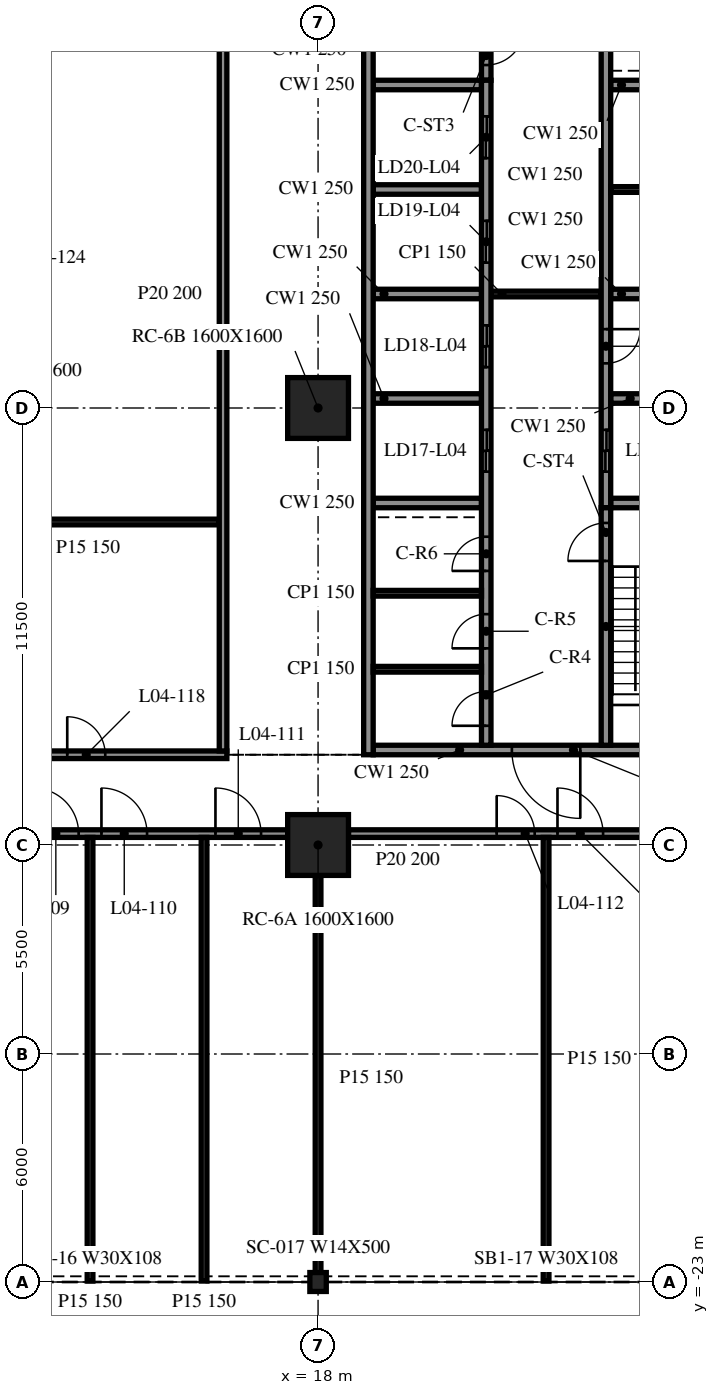
"""IFC4 building model, lengths in metres.
Left out: names, types, materials, properties, quantities, classifications, styles, units other than length and angle.
Written with IfcOpenShell. Run it as: python <this file> out.ifc"""

import sys

from ifc_helpers import new_model, si_unit, direction, frame, frame_2d, origin, origin_2d, place, context, subcontext, project, spatial, rectangle, i_section, extrude, element, fill, save


model = new_model("IFC4")
c1 = context("Model", 3, precision=1e-05, world=origin(), true_north=direction((0.0, 1.0)))
c2 = subcontext(c1, "Body", "Model", "MODEL_VIEW")
j1 = project(units=[si_unit("LENGTHUNIT", "METRE"), si_unit("PLANEANGLEUNIT", "RADIAN")], contexts=[c1])
p1 = place(None, origin())
s1 = spatial("IfcSite", under=j1, at=p1, CompositionType="ELEMENT")
p2 = place(p1, origin())
s2 = spatial("IfcBuilding", under=s1, at=p2, CompositionType="ELEMENT")
p3 = place(p2, frame((0.0, 0.0, 20.1)))
s3 = spatial("IfcBuildingStorey", under=s2, at=p3, CompositionType="ELEMENT", Elevation=20.1)
for number, where, z_axis, x_axis in (
    (1, (18.0, -11.5, -0.34), (0.0, 0.0, 1.0), (1.0, 0.0, 0.0)),
    (2, (18.0, 0.0, -0.34), (0.0, 0.0, 1.0), (1.0, 0.0, 0.0)),
):
    element("IfcColumn", number, at=place(p3, frame(where, z_axis=z_axis, x_axis=x_axis)), inside=s3, PredefinedType="COLUMN", context=c2, shape_type="SweptSolid", body=[
        extrude(rectangle(XDim=1.6, YDim=1.6, at=origin_2d()), origin(), (0.0, 0.0, 1.0), 4.3),
    ])
p4 = place(p3, frame((18.0, -23.0, -0.34), z_axis=(0.0, 0.0, 1.0), x_axis=(1.0, 0.0, 0.0)))
e3 = element("IfcColumn", 3, at=p4, inside=s3, PredefinedType="COLUMN", context=c2, shape_type="SweptSolid", body=[
    extrude(i_section(OverallWidth=0.432, OverallDepth=0.498, WebThickness=0.056, FlangeThickness=0.089, at=origin_2d()), origin(), (0.0, 0.0, 1.0), 4.3),
])
p5 = place(p3, frame((19.325, 15.125, 0.0), z_axis=(0.0, 0.0, 1.0), x_axis=(0.0, -1.0, 0.0)))
e4 = element("IfcWall", 4, at=p5, inside=s3, PredefinedType="SOLIDWALL", context=c2, shape_type="SweptSolid", body=[
    extrude(rectangle(XDim=24.25, YDim=0.25, at=frame_2d((12.125, 0.0))), origin(), (0.0, 0.0, 1.0), 3.96),
])
p6 = place(p3, frame((28.55, -9.0, 0.0), z_axis=(0.0, 0.0, 1.0), x_axis=(-1.0, 0.0, 0.0)))
e5 = element("IfcWall", 5, at=p6, inside=s3, PredefinedType="SOLIDWALL", context=c2, shape_type="SweptSolid", body=[
    extrude(rectangle(XDim=9.1, YDim=0.25, at=frame_2d((4.55, 0.0))), origin(), (0.0, 0.0, 1.0), 3.96),
])
p7 = place(p6, frame((3.65, 0.0, 0.0)))
e6 = element("IfcOpeningElement", 6, at=p7, cuts=e5, PredefinedType="OPENING", context=c2, shape_type="SweptSolid", body=[
    extrude(rectangle(XDim=1.8, YDim=2.1, at=frame_2d((0.9, 1.05))), frame((0.0, 0.135, 0.0), z_axis=(0.0, -1.0, 0.0), x_axis=(1.0, 0.0, 0.0)), (0.0, 0.0, 1.0), 0.27),
])
p8 = place(p3, frame((22.425, -8.875, 0.0), z_axis=(0.0, 0.0, 1.0), x_axis=(0.0, 1.0, 0.0)))
e7 = element("IfcWall", 7, at=p8, inside=s3, PredefinedType="SOLIDWALL", context=c2, shape_type="SweptSolid", body=[
    extrude(rectangle(XDim=17.5, YDim=0.25, at=frame_2d((8.75, 0.0))), origin(), (0.0, 0.0, 1.0), 3.96),
])
p9 = place(p8, frame((7.2, 0.0, 0.0)))
e8 = element("IfcOpeningElement", 8, at=p9, cuts=e7, PredefinedType="OPENING", context=c2, shape_type="SweptSolid", body=[
    extrude(rectangle(XDim=1.1, YDim=2.1, at=frame_2d((0.55, 1.05))), frame((0.0, 0.135, 0.0), z_axis=(0.0, -1.0, 0.0), x_axis=(1.0, 0.0, 0.0)), (0.0, 0.0, 1.0), 0.27),
])
p10 = place(p8, frame((9.95, 0.0, 0.0)))
e9 = element("IfcOpeningElement", 9, at=p10, cuts=e7, PredefinedType="OPENING", context=c2, shape_type="SweptSolid", body=[
    extrude(rectangle(XDim=1.1, YDim=2.1, at=frame_2d((0.55, 1.05))), frame((0.0, 0.135, 0.0), z_axis=(0.0, -1.0, 0.0), x_axis=(1.0, 0.0, 0.0)), (0.0, 0.0, 1.0), 0.27),
])
p11 = place(p8, frame((12.7, 0.0, 0.0)))
e10 = element("IfcOpeningElement", 10, at=p11, cuts=e7, PredefinedType="OPENING", context=c2, shape_type="SweptSolid", body=[
    extrude(rectangle(XDim=1.1, YDim=2.1, at=frame_2d((0.55, 1.05))), frame((0.0, 0.135, 0.0), z_axis=(0.0, -1.0, 0.0), x_axis=(1.0, 0.0, 0.0)), (0.0, 0.0, 1.0), 0.27),
])
p12 = place(p8, frame((15.45, 0.0, 0.0)))
e11 = element("IfcOpeningElement", 11, at=p12, cuts=e7, PredefinedType="OPENING", context=c2, shape_type="SweptSolid", body=[
    extrude(rectangle(XDim=1.1, YDim=2.1, at=frame_2d((0.55, 1.05))), frame((0.0, 0.135, 0.0), z_axis=(0.0, -1.0, 0.0), x_axis=(1.0, 0.0, 0.0)), (0.0, 0.0, 1.0), 0.27),
])
p13 = place(p8, frame((0.512, 0.0, 0.0)))
e12 = element("IfcOpeningElement", 12, at=p13, cuts=e7, PredefinedType="OPENING", context=c2, shape_type="SweptSolid", body=[
    extrude(rectangle(XDim=0.9, YDim=2.1, at=frame_2d((0.45, 1.05))), frame((0.0, 0.135, 0.0), z_axis=(0.0, -1.0, 0.0), x_axis=(1.0, 0.0, 0.0)), (0.0, 0.0, 1.0), 0.27),
])
p14 = place(p8, frame((2.55, 0.0, 0.0)))
e13 = element("IfcOpeningElement", 13, at=p14, cuts=e7, PredefinedType="OPENING", context=c2, shape_type="SweptSolid", body=[
    extrude(rectangle(XDim=0.9, YDim=2.1, at=frame_2d((0.45, 1.05))), frame((0.0, 0.135, 0.0), z_axis=(0.0, -1.0, 0.0), x_axis=(1.0, 0.0, 0.0)), (0.0, 0.0, 1.0), 0.27),
])
p15 = place(p8, frame((4.587, 0.0, 0.0)))
e14 = element("IfcOpeningElement", 14, at=p15, cuts=e7, PredefinedType="OPENING", context=c2, shape_type="SweptSolid", body=[
    extrude(rectangle(XDim=0.9, YDim=2.1, at=frame_2d((0.45, 1.05))), frame((0.0, 0.135, 0.0), z_axis=(0.0, -1.0, 0.0), x_axis=(1.0, 0.0, 0.0)), (0.0, 0.0, 1.0), 0.27),
])
p16 = place(p3, frame((22.425, 14.875, 0.0), z_axis=(0.0, 0.0, 1.0), x_axis=(0.0, -1.0, 0.0)))
e15 = element("IfcWall", 15, at=p16, inside=s3, PredefinedType="SOLIDWALL", context=c2, shape_type="SweptSolid", body=[
    extrude(rectangle(XDim=6.25, YDim=0.25, at=frame_2d((3.125, 0.0))), origin(), (0.0, 0.0, 1.0), 3.96),
])
p17 = place(p16, frame((4.85, 0.0, 0.0)))
e16 = element("IfcOpeningElement", 16, at=p17, cuts=e15, PredefinedType="OPENING", context=c2, shape_type="SweptSolid", body=[
    extrude(rectangle(XDim=1.0, YDim=2.1, at=frame_2d((0.5, 1.05))), frame((0.0, 0.135, 0.0), z_axis=(0.0, -1.0, 0.0), x_axis=(1.0, 0.0, 0.0)), (0.0, 0.0, 1.0), 0.27),
])
p18 = place(p3, frame((25.575, -8.875, 0.0), z_axis=(0.0, 0.0, 1.0), x_axis=(0.0, 1.0, 0.0)))
e17 = element("IfcWall", 17, at=p18, inside=s3, PredefinedType="SOLIDWALL", context=c2, shape_type="SweptSolid", body=[
    extrude(rectangle(XDim=6.25, YDim=0.25, at=frame_2d((3.125, 0.0))), origin(), (0.0, 0.0, 1.0), 3.96),
])
p19 = place(p18, frame((4.85, 0.0, 0.0)))
e18 = element("IfcOpeningElement", 18, at=p19, cuts=e17, PredefinedType="OPENING", context=c2, shape_type="SweptSolid", body=[
    extrude(rectangle(XDim=1.0, YDim=2.1, at=frame_2d((0.5, 1.05))), frame((0.0, 0.135, 0.0), z_axis=(0.0, -1.0, 0.0), x_axis=(1.0, 0.0, 0.0)), (0.0, 0.0, 1.0), 0.27),
])
p20 = place(p3, frame((25.575, 14.875, 0.0), z_axis=(0.0, 0.0, 1.0), x_axis=(0.0, -1.0, 0.0)))
e19 = element("IfcWall", 19, at=p20, inside=s3, PredefinedType="SOLIDWALL", context=c2, shape_type="SweptSolid", body=[
    extrude(rectangle(XDim=17.5, YDim=0.25, at=frame_2d((8.75, 0.0))), origin(), (0.0, 0.0, 1.0), 3.96),
])
p21 = place(p20, frame((15.45, 0.0, 0.0)))
e20 = element("IfcOpeningElement", 20, at=p21, cuts=e19, PredefinedType="OPENING", context=c2, shape_type="SweptSolid", body=[
    extrude(rectangle(XDim=1.1, YDim=2.1, at=frame_2d((0.55, 1.05))), frame((0.0, 0.135, 0.0), z_axis=(0.0, -1.0, 0.0), x_axis=(1.0, 0.0, 0.0)), (0.0, 0.0, 1.0), 0.27),
])
p22 = place(p20, frame((12.8, 0.0, 0.0)))
e21 = element("IfcOpeningElement", 21, at=p22, cuts=e19, PredefinedType="OPENING", context=c2, shape_type="SweptSolid", body=[
    extrude(rectangle(XDim=0.9, YDim=2.1, at=frame_2d((0.45, 1.05))), frame((0.0, 0.135, 0.0), z_axis=(0.0, -1.0, 0.0), x_axis=(1.0, 0.0, 0.0)), (0.0, 0.0, 1.0), 0.27),
])
for number, where, z_axis, x_axis in (
    (22, (19.45, -2.5, 0.0), (0.0, 0.0, 1.0), (1.0, 0.0, 0.0)),
    (23, (19.45, 0.25, 0.0), (0.0, 0.0, 1.0), (1.0, 0.0, 0.0)),
    (24, (19.45, 3.0, 0.0), (0.0, 0.0, 1.0), (1.0, 0.0, 0.0)),
    (25, (19.45, 5.75, 0.0), (0.0, 0.0, 1.0), (1.0, 0.0, 0.0)),
    (26, (19.45, 8.5, 0.0), (0.0, 0.0, 1.0), (1.0, 0.0, 0.0)),
    (27, (25.7, -2.5, 0.0), (0.0, 0.0, 1.0), (1.0, 0.0, 0.0)),
    (28, (25.7, 0.25, 0.0), (0.0, 0.0, 1.0), (1.0, 0.0, 0.0)),
    (29, (25.7, 3.0, 0.0), (0.0, 0.0, 1.0), (1.0, 0.0, 0.0)),
    (30, (25.7, 8.5, 0.0), (0.0, 0.0, 1.0), (1.0, 0.0, 0.0)),
):
    element("IfcWall", number, at=place(p3, frame(where, z_axis=z_axis, x_axis=x_axis)), inside=s3, PredefinedType="SOLIDWALL", context=c2, shape_type="SweptSolid", body=[
        extrude(rectangle(XDim=2.85, YDim=0.25, at=frame_2d((1.425, 0.0))), origin(), (0.0, 0.0, 1.0), 3.96),
    ])
p23 = place(p3, frame((22.55, 3.0, 0.0), z_axis=(0.0, 0.0, 1.0), x_axis=(1.0, 0.0, 0.0)))
e31 = element("IfcWall", 31, at=p23, inside=s3, PredefinedType="PARTITIONING", context=c2, shape_type="SweptSolid", body=[
    extrude(rectangle(XDim=2.9, YDim=0.15, at=frame_2d((1.45, 0.0))), origin(), (0.0, 0.0, 1.0), 3.96),
])
for number, where, z_axis, x_axis in (
    (32, (25.7, 5.75, 0.0), (0.0, 0.0, 1.0), (1.0, 0.0, 0.0)),
    (33, (19.45, -6.875, 0.0), (0.0, 0.0, 1.0), (1.0, 0.0, 0.0)),
    (34, (19.45, -4.875, 0.0), (0.0, 0.0, 1.0), (1.0, 0.0, 0.0)),
):
    element("IfcWall", number, at=place(p3, frame(where, z_axis=z_axis, x_axis=x_axis)), inside=s3, PredefinedType="PARTITIONING", context=c2, shape_type="SweptSolid", body=[
        extrude(rectangle(XDim=2.85, YDim=0.15, at=frame_2d((1.425, 0.0))), origin(), (0.0, 0.0, 1.0), 3.96),
    ])
p24 = place(p3, frame((6.8, -11.2, 0.0), z_axis=(0.0, 0.0, 1.0), x_axis=(1.0, 0.0, 0.0)))
e35 = element("IfcWall", 35, at=p24, inside=s3, PredefinedType="PARTITIONING", context=c2, shape_type="SweptSolid", body=[
    extrude(rectangle(XDim=10.4, YDim=0.2, at=frame_2d((5.2, 0.0))), origin(), (0.0, 0.0, 1.0), 3.96),
])
p25 = place(p24, frame((3.7, 0.0, 0.0)))
e36 = element("IfcOpeningElement", 36, at=p25, cuts=e35, PredefinedType="OPENING", context=c2, shape_type="SweptSolid", body=[
    extrude(rectangle(XDim=1.2, YDim=2.1, at=frame_2d((0.6, 1.05))), frame((0.0, 0.11, 0.0), z_axis=(0.0, -1.0, 0.0), x_axis=(1.0, 0.0, 0.0)), (0.0, 0.0, 1.0), 0.22),
])
p26 = place(p24, frame((5.5, 0.0, 0.0)))
e37 = element("IfcOpeningElement", 37, at=p26, cuts=e35, PredefinedType="OPENING", context=c2, shape_type="SweptSolid", body=[
    extrude(rectangle(XDim=1.2, YDim=2.1, at=frame_2d((0.6, 1.05))), frame((0.0, 0.11, 0.0), z_axis=(0.0, -1.0, 0.0), x_axis=(1.0, 0.0, 0.0)), (0.0, 0.0, 1.0), 0.22),
])
p27 = place(p24, frame((8.5, 0.0, 0.0)))
e38 = element("IfcOpeningElement", 38, at=p27, cuts=e35, PredefinedType="OPENING", context=c2, shape_type="SweptSolid", body=[
    extrude(rectangle(XDim=1.2, YDim=2.1, at=frame_2d((0.6, 1.05))), frame((0.0, 0.11, 0.0), z_axis=(0.0, -1.0, 0.0), x_axis=(1.0, 0.0, 0.0)), (0.0, 0.0, 1.0), 0.22),
])
p28 = place(p3, frame((18.8, -11.2, 0.0), z_axis=(0.0, 0.0, 1.0), x_axis=(1.0, 0.0, 0.0)))
e39 = element("IfcWall", 39, at=p28, inside=s3, PredefinedType="PARTITIONING", context=c2, shape_type="SweptSolid", body=[
    extrude(rectangle(XDim=10.4, YDim=0.2, at=frame_2d((5.2, 0.0))), origin(), (0.0, 0.0, 1.0), 3.96),
])
p29 = place(p28, frame((3.9, 0.0, 0.0)))
e40 = element("IfcOpeningElement", 40, at=p29, cuts=e39, PredefinedType="OPENING", context=c2, shape_type="SweptSolid", body=[
    extrude(rectangle(XDim=1.0, YDim=2.1, at=frame_2d((0.5, 1.05))), frame((0.0, 0.11, 0.0), z_axis=(0.0, -1.0, 0.0), x_axis=(1.0, 0.0, 0.0)), (0.0, 0.0, 1.0), 0.22),
])
p30 = place(p28, frame((5.5, 0.0, 0.0)))
e41 = element("IfcOpeningElement", 41, at=p30, cuts=e39, PredefinedType="OPENING", context=c2, shape_type="SweptSolid", body=[
    extrude(rectangle(XDim=1.2, YDim=2.1, at=frame_2d((0.6, 1.05))), frame((0.0, 0.11, 0.0), z_axis=(0.0, -1.0, 0.0), x_axis=(1.0, 0.0, 0.0)), (0.0, 0.0, 1.0), 0.22),
])
p31 = place(p3, frame((8.3, -9.125, 0.0), z_axis=(0.0, 0.0, 1.0), x_axis=(1.0, 0.0, 0.0)))
e42 = element("IfcWall", 42, at=p31, inside=s3, PredefinedType="PARTITIONING", context=c2, shape_type="SweptSolid", body=[
    extrude(rectangle(XDim=7.3, YDim=0.2, at=frame_2d((3.65, 0.0))), origin(), (0.0, 0.0, 1.0), 3.96),
])
p32 = place(p31, frame((3.1, 0.0, 0.0)))
e43 = element("IfcOpeningElement", 43, at=p32, cuts=e42, PredefinedType="OPENING", context=c2, shape_type="SweptSolid", body=[
    extrude(rectangle(XDim=1.0, YDim=2.1, at=frame_2d((0.5, 1.05))), frame((0.0, 0.11, 0.0), z_axis=(0.0, -1.0, 0.0), x_axis=(1.0, 0.0, 0.0)), (0.0, 0.0, 1.0), 0.22),
])
p33 = place(p3, frame((8.5, -3.0, 0.0), z_axis=(0.0, 0.0, 1.0), x_axis=(1.0, 0.0, 0.0)))
e44 = element("IfcWall", 44, at=p33, inside=s3, PredefinedType="PARTITIONING", context=c2, shape_type="SweptSolid", body=[
    extrude(rectangle(XDim=6.9, YDim=0.15, at=frame_2d((3.45, 0.0))), origin(), (0.0, 0.0, 1.0), 3.96),
])
for number, where, z_axis, x_axis in (
    (45, (12.0, -22.975, 0.0), (0.0, 0.0, 1.0), (0.0, 1.0, 0.0)),
    (46, (15.0, -22.975, 0.0), (0.0, 0.0, 1.0), (0.0, 1.0, 0.0)),
):
    element("IfcWall", number, at=place(p3, frame(where, z_axis=z_axis, x_axis=x_axis)), inside=s3, PredefinedType="PARTITIONING", context=c2, shape_type="SweptSolid", body=[
        extrude(rectangle(XDim=11.675, YDim=0.15, at=frame_2d((5.837, 0.0))), origin(), (0.0, 0.0, 1.0), 3.96),
    ])
p34 = place(p3, frame((15.5, -9.025, 0.0), z_axis=(0.0, 0.0, 1.0), x_axis=(0.0, 1.0, 0.0)))
e47 = element("IfcWall", 47, at=p34, inside=s3, PredefinedType="PARTITIONING", context=c2, shape_type="SweptSolid", body=[
    extrude(rectangle(XDim=24.05, YDim=0.2, at=frame_2d((12.025, 0.0))), origin(), (0.0, 0.0, 1.0), 3.96),
])
p35 = place(p3, frame((18.0, -22.975, 0.0), z_axis=(0.0, 0.0, 1.0), x_axis=(0.0, 1.0, 0.0)))
e48 = element("IfcWall", 48, at=p35, inside=s3, PredefinedType="PARTITIONING", context=c2, shape_type="SweptSolid", body=[
    extrude(rectangle(XDim=10.675, YDim=0.15, at=frame_2d((5.337, 0.0))), origin(), (0.0, 0.0, 1.0), 3.96),
])
p36 = place(p3, frame((24.0, -22.975, 0.0), z_axis=(0.0, 0.0, 1.0), x_axis=(0.0, 1.0, 0.0)))
e49 = element("IfcWall", 49, at=p36, inside=s3, PredefinedType="PARTITIONING", context=c2, shape_type="SweptSolid", body=[
    extrude(rectangle(XDim=11.675, YDim=0.15, at=frame_2d((5.837, 0.0))), origin(), (0.0, 0.0, 1.0), 3.96),
])
p37 = place(p7, origin())
e50 = element("IfcDoor", 50, at=p37, inside=s3, OperationType="DOUBLE_DOOR_SINGLE_SWING", PredefinedType="DOOR", context=c2, shape_type="SweptSolid", body=[
    extrude(rectangle(XDim=1.8, YDim=2.1, at=frame_2d((0.9, 1.05))), frame((0.0, 0.025, 0.0), z_axis=(0.0, -1.0, 0.0), x_axis=(1.0, 0.0, 0.0)), (0.0, 0.0, 1.0), 0.05),
])
fill(e6, e50)
p38 = place(p21, origin())
e51 = element("IfcDoor", 51, at=p38, inside=s3, OperationType="DOUBLE_DOOR_SLIDING", PredefinedType="DOOR", context=c2, shape_type="SweptSolid", body=[
    extrude(rectangle(XDim=1.1, YDim=2.1, at=frame_2d((0.55, 1.05))), frame((0.0, 0.025, 0.0), z_axis=(0.0, -1.0, 0.0), x_axis=(1.0, 0.0, 0.0)), (0.0, 0.0, 1.0), 0.05),
])
fill(e20, e51)
p39 = place(p9, origin())
e52 = element("IfcDoor", 52, at=p39, inside=s3, OperationType="DOUBLE_DOOR_SLIDING", PredefinedType="DOOR", context=c2, shape_type="SweptSolid", body=[
    extrude(rectangle(XDim=1.1, YDim=2.1, at=frame_2d((0.55, 1.05))), frame((0.0, 0.025, 0.0), z_axis=(0.0, -1.0, 0.0), x_axis=(1.0, 0.0, 0.0)), (0.0, 0.0, 1.0), 0.05),
])
fill(e8, e52)
p40 = place(p10, origin())
e53 = element("IfcDoor", 53, at=p40, inside=s3, OperationType="DOUBLE_DOOR_SLIDING", PredefinedType="DOOR", context=c2, shape_type="SweptSolid", body=[
    extrude(rectangle(XDim=1.1, YDim=2.1, at=frame_2d((0.55, 1.05))), frame((0.0, 0.025, 0.0), z_axis=(0.0, -1.0, 0.0), x_axis=(1.0, 0.0, 0.0)), (0.0, 0.0, 1.0), 0.05),
])
fill(e9, e53)
p41 = place(p11, origin())
e54 = element("IfcDoor", 54, at=p41, inside=s3, OperationType="DOUBLE_DOOR_SLIDING", PredefinedType="DOOR", context=c2, shape_type="SweptSolid", body=[
    extrude(rectangle(XDim=1.1, YDim=2.1, at=frame_2d((0.55, 1.05))), frame((0.0, 0.025, 0.0), z_axis=(0.0, -1.0, 0.0), x_axis=(1.0, 0.0, 0.0)), (0.0, 0.0, 1.0), 0.05),
])
fill(e10, e54)
p42 = place(p12, origin())
e55 = element("IfcDoor", 55, at=p42, inside=s3, OperationType="DOUBLE_DOOR_SLIDING", PredefinedType="DOOR", context=c2, shape_type="SweptSolid", body=[
    extrude(rectangle(XDim=1.1, YDim=2.1, at=frame_2d((0.55, 1.05))), frame((0.0, 0.025, 0.0), z_axis=(0.0, -1.0, 0.0), x_axis=(1.0, 0.0, 0.0)), (0.0, 0.0, 1.0), 0.05),
])
fill(e11, e55)
p43 = place(p22, origin())
e56 = element("IfcDoor", 56, at=p43, inside=s3, OperationType="SINGLE_SWING_LEFT", PredefinedType="DOOR", context=c2, shape_type="SweptSolid", body=[
    extrude(rectangle(XDim=0.9, YDim=2.1, at=frame_2d((0.45, 1.05))), frame((0.0, 0.025, 0.0), z_axis=(0.0, -1.0, 0.0), x_axis=(1.0, 0.0, 0.0)), (0.0, 0.0, 1.0), 0.05),
])
fill(e21, e56)
p44 = place(p13, origin())
e57 = element("IfcDoor", 57, at=p44, inside=s3, OperationType="SINGLE_SWING_RIGHT", PredefinedType="DOOR", context=c2, shape_type="SweptSolid", body=[
    extrude(rectangle(XDim=0.9, YDim=2.1, at=frame_2d((0.45, 1.05))), frame((0.0, 0.025, 0.0), z_axis=(0.0, -1.0, 0.0), x_axis=(1.0, 0.0, 0.0)), (0.0, 0.0, 1.0), 0.05),
])
fill(e12, e57)
p45 = place(p14, origin())
e58 = element("IfcDoor", 58, at=p45, inside=s3, OperationType="SINGLE_SWING_LEFT", PredefinedType="DOOR", context=c2, shape_type="SweptSolid", body=[
    extrude(rectangle(XDim=0.9, YDim=2.1, at=frame_2d((0.45, 1.05))), frame((0.0, 0.025, 0.0), z_axis=(0.0, -1.0, 0.0), x_axis=(1.0, 0.0, 0.0)), (0.0, 0.0, 1.0), 0.05),
])
fill(e13, e58)
p46 = place(p15, origin())
e59 = element("IfcDoor", 59, at=p46, inside=s3, OperationType="SINGLE_SWING_RIGHT", PredefinedType="DOOR", context=c2, shape_type="SweptSolid", body=[
    extrude(rectangle(XDim=0.9, YDim=2.1, at=frame_2d((0.45, 1.05))), frame((0.0, 0.025, 0.0), z_axis=(0.0, -1.0, 0.0), x_axis=(1.0, 0.0, 0.0)), (0.0, 0.0, 1.0), 0.05),
])
fill(e14, e59)
p47 = place(p17, origin())
e60 = element("IfcDoor", 60, at=p47, inside=s3, OperationType="SINGLE_SWING_LEFT", PredefinedType="DOOR", context=c2, shape_type="SweptSolid", body=[
    extrude(rectangle(XDim=1.0, YDim=2.1, at=frame_2d((0.5, 1.05))), frame((0.0, 0.025, 0.0), z_axis=(0.0, -1.0, 0.0), x_axis=(1.0, 0.0, 0.0)), (0.0, 0.0, 1.0), 0.05),
])
fill(e16, e60)
p48 = place(p19, origin())
e61 = element("IfcDoor", 61, at=p48, inside=s3, OperationType="SINGLE_SWING_RIGHT", PredefinedType="DOOR", context=c2, shape_type="SweptSolid", body=[
    extrude(rectangle(XDim=1.0, YDim=2.1, at=frame_2d((0.5, 1.05))), frame((0.0, 0.025, 0.0), z_axis=(0.0, -1.0, 0.0), x_axis=(1.0, 0.0, 0.0)), (0.0, 0.0, 1.0), 0.05),
])
fill(e18, e61)
p49 = place(p25, origin())
e62 = element("IfcDoor", 62, at=p49, inside=s3, OperationType="SINGLE_SWING_RIGHT", PredefinedType="DOOR", context=c2, shape_type="SweptSolid", body=[
    extrude(rectangle(XDim=1.2, YDim=2.1, at=frame_2d((0.6, 1.05))), frame((0.0, 0.025, 0.0), z_axis=(0.0, -1.0, 0.0), x_axis=(1.0, 0.0, 0.0)), (0.0, 0.0, 1.0), 0.05),
])
fill(e36, e62)
p50 = place(p26, origin())
e63 = element("IfcDoor", 63, at=p50, inside=s3, OperationType="SINGLE_SWING_LEFT", PredefinedType="DOOR", context=c2, shape_type="SweptSolid", body=[
    extrude(rectangle(XDim=1.2, YDim=2.1, at=frame_2d((0.6, 1.05))), frame((0.0, 0.025, 0.0), z_axis=(0.0, -1.0, 0.0), x_axis=(1.0, 0.0, 0.0)), (0.0, 0.0, 1.0), 0.05),
])
fill(e37, e63)
p51 = place(p27, origin())
e64 = element("IfcDoor", 64, at=p51, inside=s3, OperationType="SINGLE_SWING_LEFT", PredefinedType="DOOR", context=c2, shape_type="SweptSolid", body=[
    extrude(rectangle(XDim=1.2, YDim=2.1, at=frame_2d((0.6, 1.05))), frame((0.0, 0.025, 0.0), z_axis=(0.0, -1.0, 0.0), x_axis=(1.0, 0.0, 0.0)), (0.0, 0.0, 1.0), 0.05),
])
fill(e38, e64)
p52 = place(p29, origin())
e65 = element("IfcDoor", 65, at=p52, inside=s3, OperationType="SINGLE_SWING_RIGHT", PredefinedType="DOOR", context=c2, shape_type="SweptSolid", body=[
    extrude(rectangle(XDim=1.0, YDim=2.1, at=frame_2d((0.5, 1.05))), frame((0.0, 0.025, 0.0), z_axis=(0.0, -1.0, 0.0), x_axis=(1.0, 0.0, 0.0)), (0.0, 0.0, 1.0), 0.05),
])
fill(e40, e65)
p53 = place(p30, origin())
e66 = element("IfcDoor", 66, at=p53, inside=s3, OperationType="SINGLE_SWING_LEFT", PredefinedType="DOOR", context=c2, shape_type="SweptSolid", body=[
    extrude(rectangle(XDim=1.2, YDim=2.1, at=frame_2d((0.6, 1.05))), frame((0.0, 0.025, 0.0), z_axis=(0.0, -1.0, 0.0), x_axis=(1.0, 0.0, 0.0)), (0.0, 0.0, 1.0), 0.05),
])
fill(e41, e66)
p54 = place(p32, origin())
e67 = element("IfcDoor", 67, at=p54, inside=s3, OperationType="SINGLE_SWING_LEFT", PredefinedType="DOOR", context=c2, shape_type="SweptSolid", body=[
    extrude(rectangle(XDim=1.0, YDim=2.1, at=frame_2d((0.5, 1.05))), frame((0.0, 0.025, 0.0), z_axis=(0.0, -1.0, 0.0), x_axis=(1.0, 0.0, 0.0)), (0.0, 0.0, 1.0), 0.05),
])
fill(e43, e67)
save(model, sys.argv[1])
